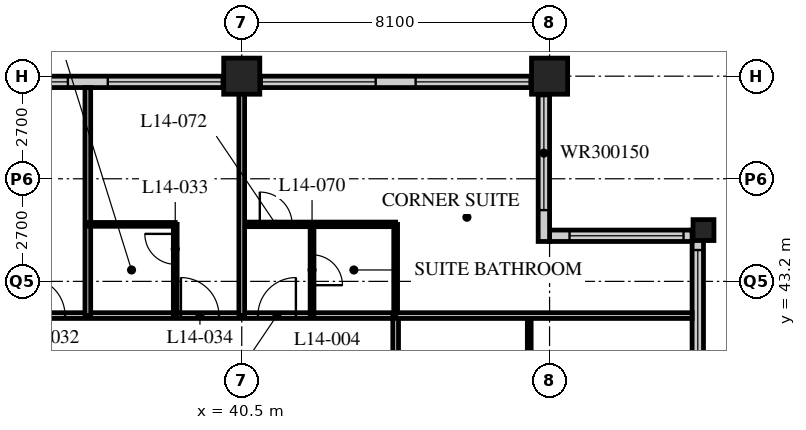
"""IFC4 building model, lengths in metres.
Left out: names, types, materials, properties, quantities, classifications, styles, units other than length and angle.
Written with IfcOpenShell. Run it as: python <this file> out.ifc"""

import sys

from ifc_helpers import new_model, si_unit, direction, frame, frame_2d, origin, origin_2d, place, context, subcontext, project, spatial, rectangle, hollow_rectangle, extrude, element, fill, save


model = new_model("IFC4")
c1 = context("Model", 3, precision=1e-05, world=origin(), true_north=direction((0.0, 1.0)))
c2 = subcontext(c1, "Body", "Model", "MODEL_VIEW")
j1 = project(units=[si_unit("LENGTHUNIT", "METRE"), si_unit("PLANEANGLEUNIT", "RADIAN")], contexts=[c1])
p1 = place(None, origin())
s1 = spatial("IfcSite", under=j1, at=p1, CompositionType="ELEMENT")
p2 = place(p1, origin())
s2 = spatial("IfcBuilding", under=s1, at=p2, CompositionType="ELEMENT")
p3 = place(p2, frame((0.0, 0.0, 60.2)))
s3 = spatial("IfcBuildingStorey", under=s2, at=p3, CompositionType="ELEMENT", Elevation=60.2)
for number, where, z_axis, x_axis in (
    (1, (40.5, 48.6, 0.0), (0.0, 0.0, 1.0), (1.0, 0.0, 0.0)),
    (2, (48.6, 48.6, 0.0), (0.0, 0.0, 1.0), (1.0, 0.0, 0.0)),
):
    element("IfcColumn", number, at=place(p3, frame(where, z_axis=z_axis, x_axis=x_axis)), inside=s3, PredefinedType="COLUMN", context=c2, shape_type="SweptSolid", body=[
        extrude(hollow_rectangle(XDim=0.95, YDim=0.95, WallThickness=0.095, at=origin_2d()), origin(), (0.0, 0.0, 1.0), 3.4),
    ])
p4 = place(p3, frame((52.65, 44.55, 0.0), z_axis=(0.0, 0.0, 1.0), x_axis=(1.0, 0.0, 0.0)))
e3 = element("IfcColumn", 3, at=p4, inside=s3, PredefinedType="COLUMN", context=c2, shape_type="SweptSolid", body=[
    extrude(hollow_rectangle(XDim=0.55, YDim=0.55, WallThickness=0.05, at=origin_2d()), origin(), (0.0, 0.0, 1.0), 3.4),
])
p5 = place(p3, frame((52.5, 40.2, 0.0), z_axis=(0.0, 0.0, 1.0), x_axis=(0.0, 1.0, 0.0)))
e4 = element("IfcWall", 4, at=p5, inside=s3, PredefinedType="SOLIDWALL", context=c2, shape_type="SweptSolid", body=[
    extrude(rectangle(XDim=4.35, YDim=0.3, at=frame_2d((2.175, 0.0))), origin(), (0.0, 0.0, 1.0), 3.19),
])
p6 = place(p5, frame((0.825, 0.0, 0.9)))
e5 = element("IfcOpeningElement", 5, at=p6, cuts=e4, PredefinedType="OPENING", context=c2, shape_type="SweptSolid", body=[
    extrude(rectangle(XDim=3.0, YDim=1.5, at=frame_2d((1.5, 0.75))), frame((0.0, 0.16, 0.0), z_axis=(0.0, -1.0, 0.0), x_axis=(1.0, 0.0, 0.0)), (0.0, 0.0, 1.0), 0.32),
])
p7 = place(p3, frame((52.35, 44.4, 0.0), z_axis=(0.0, 0.0, 1.0), x_axis=(-1.0, 0.0, 0.0)))
e6 = element("IfcWall", 6, at=p7, inside=s3, PredefinedType="SOLIDWALL", context=c2, shape_type="SweptSolid", body=[
    extrude(rectangle(XDim=3.75, YDim=0.3, at=frame_2d((1.875, 0.0))), origin(), (0.0, 0.0, 1.0), 3.19),
])
p8 = place(p7, frame((0.225, 0.0, 0.9)))
e7 = element("IfcOpeningElement", 7, at=p8, cuts=e6, PredefinedType="OPENING", context=c2, shape_type="SweptSolid", body=[
    extrude(rectangle(XDim=3.0, YDim=1.5, at=frame_2d((1.5, 0.75))), frame((0.0, 0.16, 0.0), z_axis=(0.0, -1.0, 0.0), x_axis=(1.0, 0.0, 0.0)), (0.0, 0.0, 1.0), 0.32),
])
p9 = place(p3, frame((48.45, 44.25, 0.0), z_axis=(0.0, 0.0, 1.0), x_axis=(0.0, 1.0, 0.0)))
e8 = element("IfcWall", 8, at=p9, inside=s3, PredefinedType="SOLIDWALL", context=c2, shape_type="SweptSolid", body=[
    extrude(rectangle(XDim=4.35, YDim=0.3, at=frame_2d((2.175, 0.0))), origin(), (0.0, 0.0, 1.0), 3.19),
])
p10 = place(p9, frame((0.825, 0.0, 0.9)))
e9 = element("IfcOpeningElement", 9, at=p10, cuts=e8, PredefinedType="OPENING", context=c2, shape_type="SweptSolid", body=[
    extrude(rectangle(XDim=3.0, YDim=1.5, at=frame_2d((1.5, 0.75))), frame((0.0, 0.16, 0.0), z_axis=(0.0, -1.0, 0.0), x_axis=(1.0, 0.0, 0.0)), (0.0, 0.0, 1.0), 0.32),
])
p11 = place(p3, frame((48.3, 48.45, 0.0), z_axis=(0.0, 0.0, 1.0), x_axis=(-1.0, 0.0, 0.0)))
e10 = element("IfcWall", 10, at=p11, inside=s3, PredefinedType="SOLIDWALL", context=c2, shape_type="SweptSolid", body=[
    extrude(rectangle(XDim=40.2, YDim=0.3, at=frame_2d((20.1, 0.0))), origin(), (0.0, 0.0, 1.0), 3.19),
])
p12 = place(p11, frame((0.225, 0.0, 0.9)))
e11 = element("IfcOpeningElement", 11, at=p12, cuts=e10, PredefinedType="OPENING", context=c2, shape_type="SweptSolid", body=[
    extrude(rectangle(XDim=3.0, YDim=2.0, at=frame_2d((1.5, 1.0))), frame((0.0, 0.16, 0.0), z_axis=(0.0, -1.0, 0.0), x_axis=(1.0, 0.0, 0.0)), (0.0, 0.0, 1.0), 0.32),
])
p13 = place(p11, frame((4.275, 0.0, 0.9)))
e12 = element("IfcOpeningElement", 12, at=p13, cuts=e10, PredefinedType="OPENING", context=c2, shape_type="SweptSolid", body=[
    extrude(rectangle(XDim=3.0, YDim=2.0, at=frame_2d((1.5, 1.0))), frame((0.0, 0.16, 0.0), z_axis=(0.0, -1.0, 0.0), x_axis=(1.0, 0.0, 0.0)), (0.0, 0.0, 1.0), 0.32),
])
p14 = place(p11, frame((8.325, 0.0, 0.9)))
e13 = element("IfcOpeningElement", 13, at=p14, cuts=e10, PredefinedType="OPENING", context=c2, shape_type="SweptSolid", body=[
    extrude(rectangle(XDim=3.0, YDim=2.0, at=frame_2d((1.5, 1.0))), frame((0.0, 0.16, 0.0), z_axis=(0.0, -1.0, 0.0), x_axis=(1.0, 0.0, 0.0)), (0.0, 0.0, 1.0), 0.32),
])
p15 = place(p11, frame((12.375, 0.0, 0.9)))
e14 = element("IfcOpeningElement", 14, at=p15, cuts=e10, PredefinedType="OPENING", context=c2, shape_type="SweptSolid", body=[
    extrude(rectangle(XDim=3.0, YDim=2.0, at=frame_2d((1.5, 1.0))), frame((0.0, 0.16, 0.0), z_axis=(0.0, -1.0, 0.0), x_axis=(1.0, 0.0, 0.0)), (0.0, 0.0, 1.0), 0.32),
])
p16 = place(p11, frame((16.425, 0.0, 0.9)))
e15 = element("IfcOpeningElement", 15, at=p16, cuts=e10, PredefinedType="OPENING", context=c2, shape_type="SweptSolid", body=[
    extrude(rectangle(XDim=3.0, YDim=2.0, at=frame_2d((1.5, 1.0))), frame((0.0, 0.16, 0.0), z_axis=(0.0, -1.0, 0.0), x_axis=(1.0, 0.0, 0.0)), (0.0, 0.0, 1.0), 0.32),
])
p17 = place(p11, frame((20.475, 0.0, 0.9)))
e16 = element("IfcOpeningElement", 16, at=p17, cuts=e10, PredefinedType="OPENING", context=c2, shape_type="SweptSolid", body=[
    extrude(rectangle(XDim=3.0, YDim=2.0, at=frame_2d((1.5, 1.0))), frame((0.0, 0.16, 0.0), z_axis=(0.0, -1.0, 0.0), x_axis=(1.0, 0.0, 0.0)), (0.0, 0.0, 1.0), 0.32),
])
p18 = place(p11, frame((24.525, 0.0, 0.9)))
e17 = element("IfcOpeningElement", 17, at=p18, cuts=e10, PredefinedType="OPENING", context=c2, shape_type="SweptSolid", body=[
    extrude(rectangle(XDim=3.0, YDim=2.0, at=frame_2d((1.5, 1.0))), frame((0.0, 0.16, 0.0), z_axis=(0.0, -1.0, 0.0), x_axis=(1.0, 0.0, 0.0)), (0.0, 0.0, 1.0), 0.32),
])
p19 = place(p11, frame((28.575, 0.0, 0.9)))
e18 = element("IfcOpeningElement", 18, at=p19, cuts=e10, PredefinedType="OPENING", context=c2, shape_type="SweptSolid", body=[
    extrude(rectangle(XDim=3.0, YDim=2.0, at=frame_2d((1.5, 1.0))), frame((0.0, 0.16, 0.0), z_axis=(0.0, -1.0, 0.0), x_axis=(1.0, 0.0, 0.0)), (0.0, 0.0, 1.0), 0.32),
])
p20 = place(p11, frame((32.625, 0.0, 0.9)))
e19 = element("IfcOpeningElement", 19, at=p20, cuts=e10, PredefinedType="OPENING", context=c2, shape_type="SweptSolid", body=[
    extrude(rectangle(XDim=3.0, YDim=2.0, at=frame_2d((1.5, 1.0))), frame((0.0, 0.16, 0.0), z_axis=(0.0, -1.0, 0.0), x_axis=(1.0, 0.0, 0.0)), (0.0, 0.0, 1.0), 0.32),
])
p21 = place(p11, frame((36.675, 0.0, 0.9)))
e20 = element("IfcOpeningElement", 20, at=p21, cuts=e10, PredefinedType="OPENING", context=c2, shape_type="SweptSolid", body=[
    extrude(rectangle(XDim=3.0, YDim=2.0, at=frame_2d((1.5, 1.0))), frame((0.0, 0.16, 0.0), z_axis=(0.0, -1.0, 0.0), x_axis=(1.0, 0.0, 0.0)), (0.0, 0.0, 1.0), 0.32),
])
p22 = place(p3, frame((12.15, 42.3, 0.0), z_axis=(0.0, 0.0, 1.0), x_axis=(1.0, 0.0, 0.0)))
e21 = element("IfcWall", 21, at=p22, inside=s3, PredefinedType="PARTITIONING", context=c2, shape_type="SweptSolid", body=[
    extrude(rectangle(XDim=32.4, YDim=0.15, at=frame_2d((16.2, 0.0))), origin(), (0.0, 0.0, 1.0), 3.19),
])
p23 = place(p22, frame((6.5, 0.0, 0.0)))
e22 = element("IfcOpeningElement", 22, at=p23, cuts=e21, PredefinedType="OPENING", context=c2, shape_type="SweptSolid", body=[
    extrude(rectangle(XDim=1.0, YDim=2.1, at=frame_2d((0.5, 1.05))), frame((0.0, 0.085, 0.0), z_axis=(0.0, -1.0, 0.0), x_axis=(1.0, 0.0, 0.0)), (0.0, 0.0, 1.0), 0.17),
])
p24 = place(p22, frame((10.55, 0.0, 0.0)))
e23 = element("IfcOpeningElement", 23, at=p24, cuts=e21, PredefinedType="OPENING", context=c2, shape_type="SweptSolid", body=[
    extrude(rectangle(XDim=1.0, YDim=2.1, at=frame_2d((0.5, 1.05))), frame((0.0, 0.085, 0.0), z_axis=(0.0, -1.0, 0.0), x_axis=(1.0, 0.0, 0.0)), (0.0, 0.0, 1.0), 0.17),
])
p25 = place(p22, frame((14.6, 0.0, 0.0)))
e24 = element("IfcOpeningElement", 24, at=p25, cuts=e21, PredefinedType="OPENING", context=c2, shape_type="SweptSolid", body=[
    extrude(rectangle(XDim=1.0, YDim=2.1, at=frame_2d((0.5, 1.05))), frame((0.0, 0.085, 0.0), z_axis=(0.0, -1.0, 0.0), x_axis=(1.0, 0.0, 0.0)), (0.0, 0.0, 1.0), 0.17),
])
p26 = place(p22, frame((18.65, 0.0, 0.0)))
e25 = element("IfcOpeningElement", 25, at=p26, cuts=e21, PredefinedType="OPENING", context=c2, shape_type="SweptSolid", body=[
    extrude(rectangle(XDim=1.0, YDim=2.1, at=frame_2d((0.5, 1.05))), frame((0.0, 0.085, 0.0), z_axis=(0.0, -1.0, 0.0), x_axis=(1.0, 0.0, 0.0)), (0.0, 0.0, 1.0), 0.17),
])
p27 = place(p22, frame((22.7, 0.0, 0.0)))
e26 = element("IfcOpeningElement", 26, at=p27, cuts=e21, PredefinedType="OPENING", context=c2, shape_type="SweptSolid", body=[
    extrude(rectangle(XDim=1.0, YDim=2.1, at=frame_2d((0.5, 1.05))), frame((0.0, 0.085, 0.0), z_axis=(0.0, -1.0, 0.0), x_axis=(1.0, 0.0, 0.0)), (0.0, 0.0, 1.0), 0.17),
])
p28 = place(p22, frame((26.75, 0.0, 0.0)))
e27 = element("IfcOpeningElement", 27, at=p28, cuts=e21, PredefinedType="OPENING", context=c2, shape_type="SweptSolid", body=[
    extrude(rectangle(XDim=1.0, YDim=2.1, at=frame_2d((0.5, 1.05))), frame((0.0, 0.085, 0.0), z_axis=(0.0, -1.0, 0.0), x_axis=(1.0, 0.0, 0.0)), (0.0, 0.0, 1.0), 0.17),
])
p29 = place(p22, frame((28.775, 0.0, 0.0)))
e28 = element("IfcOpeningElement", 28, at=p29, cuts=e21, PredefinedType="OPENING", context=c2, shape_type="SweptSolid", body=[
    extrude(rectangle(XDim=1.0, YDim=2.1, at=frame_2d((0.5, 1.05))), frame((0.0, 0.085, 0.0), z_axis=(0.0, -1.0, 0.0), x_axis=(1.0, 0.0, 0.0)), (0.0, 0.0, 1.0), 0.17),
])
p30 = place(p22, frame((2.625, 0.0, 0.0)))
e29 = element("IfcOpeningElement", 29, at=p30, cuts=e21, PredefinedType="OPENING", context=c2, shape_type="SweptSolid", body=[
    extrude(rectangle(XDim=1.0, YDim=2.1, at=frame_2d((0.5, 1.05))), frame((0.0, 0.085, 0.0), z_axis=(0.0, -1.0, 0.0), x_axis=(1.0, 0.0, 0.0)), (0.0, 0.0, 1.0), 0.17),
])
p31 = place(p3, frame((44.55, 12.15, 0.0), z_axis=(0.0, 0.0, 1.0), x_axis=(0.0, 1.0, 0.0)))
e30 = element("IfcWall", 30, at=p31, inside=s3, PredefinedType="PARTITIONING", context=c2, shape_type="SweptSolid", body=[
    extrude(rectangle(XDim=30.15, YDim=0.15, at=frame_2d((15.075, 0.0))), origin(), (0.0, 0.0, 1.0), 3.19),
])
p32 = place(p31, frame((2.75, 0.0, 0.0)))
e31 = element("IfcOpeningElement", 31, at=p32, cuts=e30, PredefinedType="OPENING", context=c2, shape_type="SweptSolid", body=[
    extrude(rectangle(XDim=1.0, YDim=2.1, at=frame_2d((0.5, 1.05))), frame((0.0, 0.085, 0.0), z_axis=(0.0, -1.0, 0.0), x_axis=(1.0, 0.0, 0.0)), (0.0, 0.0, 1.0), 0.17),
])
p33 = place(p31, frame((6.5, 0.0, 0.0)))
e32 = element("IfcOpeningElement", 32, at=p33, cuts=e30, PredefinedType="OPENING", context=c2, shape_type="SweptSolid", body=[
    extrude(rectangle(XDim=1.0, YDim=2.1, at=frame_2d((0.5, 1.05))), frame((0.0, 0.085, 0.0), z_axis=(0.0, -1.0, 0.0), x_axis=(1.0, 0.0, 0.0)), (0.0, 0.0, 1.0), 0.17),
])
p34 = place(p31, frame((10.55, 0.0, 0.0)))
e33 = element("IfcOpeningElement", 33, at=p34, cuts=e30, PredefinedType="OPENING", context=c2, shape_type="SweptSolid", body=[
    extrude(rectangle(XDim=1.0, YDim=2.1, at=frame_2d((0.5, 1.05))), frame((0.0, 0.085, 0.0), z_axis=(0.0, -1.0, 0.0), x_axis=(1.0, 0.0, 0.0)), (0.0, 0.0, 1.0), 0.17),
])
p35 = place(p31, frame((14.6, 0.0, 0.0)))
e34 = element("IfcOpeningElement", 34, at=p35, cuts=e30, PredefinedType="OPENING", context=c2, shape_type="SweptSolid", body=[
    extrude(rectangle(XDim=1.0, YDim=2.1, at=frame_2d((0.5, 1.05))), frame((0.0, 0.085, 0.0), z_axis=(0.0, -1.0, 0.0), x_axis=(1.0, 0.0, 0.0)), (0.0, 0.0, 1.0), 0.17),
])
p36 = place(p31, frame((18.65, 0.0, 0.0)))
e35 = element("IfcOpeningElement", 35, at=p36, cuts=e30, PredefinedType="OPENING", context=c2, shape_type="SweptSolid", body=[
    extrude(rectangle(XDim=1.0, YDim=2.1, at=frame_2d((0.5, 1.05))), frame((0.0, 0.085, 0.0), z_axis=(0.0, -1.0, 0.0), x_axis=(1.0, 0.0, 0.0)), (0.0, 0.0, 1.0), 0.17),
])
p37 = place(p31, frame((22.7, 0.0, 0.0)))
e36 = element("IfcOpeningElement", 36, at=p37, cuts=e30, PredefinedType="OPENING", context=c2, shape_type="SweptSolid", body=[
    extrude(rectangle(XDim=1.0, YDim=2.1, at=frame_2d((0.5, 1.05))), frame((0.0, 0.085, 0.0), z_axis=(0.0, -1.0, 0.0), x_axis=(1.0, 0.0, 0.0)), (0.0, 0.0, 1.0), 0.17),
])
p38 = place(p31, frame((26.7, 0.0, 0.0)))
e37 = element("IfcOpeningElement", 37, at=p38, cuts=e30, PredefinedType="OPENING", context=c2, shape_type="SweptSolid", body=[
    extrude(rectangle(XDim=1.0, YDim=2.1, at=frame_2d((0.5, 1.05))), frame((0.0, 0.085, 0.0), z_axis=(0.0, -1.0, 0.0), x_axis=(1.0, 0.0, 0.0)), (0.0, 0.0, 1.0), 0.17),
])
p39 = place(p3, frame((36.45, 42.3, 0.0), z_axis=(0.0, 0.0, 1.0), x_axis=(0.0, 1.0, 0.0)))
e38 = element("IfcWall", 38, at=p39, inside=s3, PredefinedType="PARTITIONING", context=c2, shape_type="SweptSolid", body=[
    extrude(rectangle(XDim=6.0, YDim=0.15, at=frame_2d((3.0, 0.0))), origin(), (0.0, 0.0, 1.0), 3.19),
])
p40 = place(p3, frame((36.45, 44.7, 0.0), z_axis=(0.0, 0.0, 1.0), x_axis=(1.0, 0.0, 0.0)))
e39 = element("IfcWall", 39, at=p40, inside=s3, PredefinedType="PARTITIONING", context=c2, shape_type="SweptSolid", body=[
    extrude(rectangle(XDim=2.3, YDim=0.1, at=frame_2d((1.15, 0.0))), origin(), (0.0, 0.0, 1.0), 3.19),
])
p41 = place(p3, frame((38.75, 42.3, 0.0), z_axis=(0.0, 0.0, 1.0), x_axis=(0.0, 1.0, 0.0)))
e40 = element("IfcWall", 40, at=p41, inside=s3, PredefinedType="PARTITIONING", context=c2, shape_type="SweptSolid", body=[
    extrude(rectangle(XDim=2.4, YDim=0.1, at=frame_2d((1.2, 0.0))), origin(), (0.0, 0.0, 1.0), 3.19),
])
p42 = place(p41, frame((1.35, 0.0, 0.0)))
e41 = element("IfcOpeningElement", 41, at=p42, cuts=e40, PredefinedType="OPENING", context=c2, shape_type="SweptSolid", body=[
    extrude(rectangle(XDim=0.8, YDim=2.1, at=frame_2d((0.4, 1.05))), frame((0.0, 0.06, 0.0), z_axis=(0.0, -1.0, 0.0), x_axis=(1.0, 0.0, 0.0)), (0.0, 0.0, 1.0), 0.12),
])
p43 = place(p3, frame((48.065, 40.0, 0.0), z_axis=(0.0, 0.0, 1.0), x_axis=(0.0, 1.0, 0.0)))
e42 = element("IfcWall", 42, at=p43, inside=s3, PredefinedType="PARTITIONING", context=c2, shape_type="SweptSolid", body=[
    extrude(rectangle(XDim=2.3, YDim=0.1, at=frame_2d((1.15, 0.0))), origin(), (0.0, 0.0, 1.0), 3.19),
])
p44 = place(p3, frame((40.5, 44.7, 0.0), z_axis=(0.0, 0.0, 1.0), x_axis=(1.0, 0.0, 0.0)))
e43 = element("IfcWall", 43, at=p44, inside=s3, PredefinedType="PARTITIONING", context=c2, shape_type="SweptSolid", body=[
    extrude(rectangle(XDim=4.05, YDim=0.12, at=frame_2d((2.025, 0.0))), origin(), (0.0, 0.0, 1.0), 3.19),
])
p45 = place(p44, frame((0.475, 0.0, 0.0)))
e44 = element("IfcOpeningElement", 44, at=p45, cuts=e43, PredefinedType="OPENING", context=c2, shape_type="SweptSolid", body=[
    extrude(rectangle(XDim=0.85, YDim=2.1, at=frame_2d((0.425, 1.05))), frame((0.0, 0.07, 0.0), z_axis=(0.0, -1.0, 0.0), x_axis=(1.0, 0.0, 0.0)), (0.0, 0.0, 1.0), 0.14),
])
p46 = place(p3, frame((42.35, 42.3, 0.0), z_axis=(0.0, 0.0, 1.0), x_axis=(0.0, 1.0, 0.0)))
e45 = element("IfcWall", 45, at=p46, inside=s3, PredefinedType="PARTITIONING", context=c2, shape_type="SweptSolid", body=[
    extrude(rectangle(XDim=2.4, YDim=0.1, at=frame_2d((1.2, 0.0))), origin(), (0.0, 0.0, 1.0), 3.19),
])
p47 = place(p46, frame((0.8, 0.0, 0.0)))
e46 = element("IfcOpeningElement", 46, at=p47, cuts=e45, PredefinedType="OPENING", context=c2, shape_type="SweptSolid", body=[
    extrude(rectangle(XDim=0.8, YDim=2.1, at=frame_2d((0.4, 1.05))), frame((0.0, 0.06, 0.0), z_axis=(0.0, -1.0, 0.0), x_axis=(1.0, 0.0, 0.0)), (0.0, 0.0, 1.0), 0.12),
])
p48 = place(p3, frame((44.55, 42.3, 0.0), z_axis=(0.0, 0.0, 1.0), x_axis=(0.0, 1.0, 0.0)))
e47 = element("IfcWall", 47, at=p48, inside=s3, PredefinedType="PARTITIONING", context=c2, shape_type="SweptSolid", body=[
    extrude(rectangle(XDim=2.4, YDim=0.1, at=frame_2d((1.2, 0.0))), origin(), (0.0, 0.0, 1.0), 3.19),
])
p49 = place(p3, frame((44.55, 42.3, 0.0), z_axis=(0.0, 0.0, 1.0), x_axis=(1.0, 0.0, 0.0)))
e48 = element("IfcWall", 48, at=p49, inside=s3, PredefinedType="PARTITIONING", context=c2, shape_type="SweptSolid", body=[
    extrude(rectangle(XDim=7.8, YDim=0.15, at=frame_2d((3.9, 0.0))), origin(), (0.0, 0.0, 1.0), 3.19),
])
p50 = place(p3, frame((40.5, 42.3, 0.0), z_axis=(0.0, 0.0, 1.0), x_axis=(0.0, 1.0, 0.0)))
e49 = element("IfcWall", 49, at=p50, inside=s3, PredefinedType="PARTITIONING", context=c2, shape_type="SweptSolid", body=[
    extrude(rectangle(XDim=6.0, YDim=0.15, at=frame_2d((3.0, 0.0))), origin(), (0.0, 0.0, 1.0), 2.578),
])
p51 = place(p6, origin())
e50 = element("IfcWindow", 50, at=p51, inside=s3, PartitioningType="SINGLE_PANEL", PredefinedType="WINDOW", context=c2, shape_type="SweptSolid", body=[
    extrude(rectangle(XDim=3.0, YDim=1.5, at=frame_2d((1.5, 0.75))), frame((0.0, 0.03, 0.0), z_axis=(0.0, -1.0, 0.0), x_axis=(1.0, 0.0, 0.0)), (0.0, 0.0, 1.0), 0.06),
])
fill(e5, e50)
p52 = place(p8, origin())
e51 = element("IfcWindow", 51, at=p52, inside=s3, PartitioningType="SINGLE_PANEL", PredefinedType="WINDOW", context=c2, shape_type="SweptSolid", body=[
    extrude(rectangle(XDim=3.0, YDim=1.5, at=frame_2d((1.5, 0.75))), frame((0.0, 0.03, 0.0), z_axis=(0.0, -1.0, 0.0), x_axis=(1.0, 0.0, 0.0)), (0.0, 0.0, 1.0), 0.06),
])
fill(e7, e51)
p53 = place(p10, origin())
e52 = element("IfcWindow", 52, at=p53, inside=s3, PartitioningType="SINGLE_PANEL", PredefinedType="WINDOW", context=c2, shape_type="SweptSolid", body=[
    extrude(rectangle(XDim=3.0, YDim=1.5, at=frame_2d((1.5, 0.75))), frame((0.0, 0.03, 0.0), z_axis=(0.0, -1.0, 0.0), x_axis=(1.0, 0.0, 0.0)), (0.0, 0.0, 1.0), 0.06),
])
fill(e9, e52)
p54 = place(p12, origin())
e53 = element("IfcWindow", 53, at=p54, inside=s3, PartitioningType="SINGLE_PANEL", PredefinedType="WINDOW", context=c2, shape_type="SweptSolid", body=[
    extrude(rectangle(XDim=3.0, YDim=2.0, at=frame_2d((1.5, 1.0))), frame((0.0, 0.03, 0.0), z_axis=(0.0, -1.0, 0.0), x_axis=(1.0, 0.0, 0.0)), (0.0, 0.0, 1.0), 0.06),
])
fill(e11, e53)
p55 = place(p13, origin())
e54 = element("IfcWindow", 54, at=p55, inside=s3, PartitioningType="SINGLE_PANEL", PredefinedType="WINDOW", context=c2, shape_type="SweptSolid", body=[
    extrude(rectangle(XDim=3.0, YDim=2.0, at=frame_2d((1.5, 1.0))), frame((0.0, 0.03, 0.0), z_axis=(0.0, -1.0, 0.0), x_axis=(1.0, 0.0, 0.0)), (0.0, 0.0, 1.0), 0.06),
])
fill(e12, e54)
p56 = place(p14, origin())
e55 = element("IfcWindow", 55, at=p56, inside=s3, PartitioningType="SINGLE_PANEL", PredefinedType="WINDOW", context=c2, shape_type="SweptSolid", body=[
    extrude(rectangle(XDim=3.0, YDim=2.0, at=frame_2d((1.5, 1.0))), frame((0.0, 0.03, 0.0), z_axis=(0.0, -1.0, 0.0), x_axis=(1.0, 0.0, 0.0)), (0.0, 0.0, 1.0), 0.06),
])
fill(e13, e55)
p57 = place(p15, origin())
e56 = element("IfcWindow", 56, at=p57, inside=s3, PartitioningType="SINGLE_PANEL", PredefinedType="WINDOW", context=c2, shape_type="SweptSolid", body=[
    extrude(rectangle(XDim=3.0, YDim=2.0, at=frame_2d((1.5, 1.0))), frame((0.0, 0.03, 0.0), z_axis=(0.0, -1.0, 0.0), x_axis=(1.0, 0.0, 0.0)), (0.0, 0.0, 1.0), 0.06),
])
fill(e14, e56)
p58 = place(p27, origin())
e57 = element("IfcDoor", 57, at=p58, inside=s3, OperationType="SINGLE_SWING_LEFT", PredefinedType="DOOR", context=c2, shape_type="SweptSolid", body=[
    extrude(rectangle(XDim=1.0, YDim=2.1, at=frame_2d((0.5, 1.05))), frame((0.0, 0.025, 0.0), z_axis=(0.0, -1.0, 0.0), x_axis=(1.0, 0.0, 0.0)), (0.0, 0.0, 1.0), 0.05),
])
fill(e26, e57)
p59 = place(p42, origin())
e58 = element("IfcDoor", 58, at=p59, inside=s3, OperationType="SINGLE_SWING_RIGHT", PredefinedType="DOOR", context=c2, shape_type="SweptSolid", body=[
    extrude(rectangle(XDim=0.8, YDim=2.1, at=frame_2d((0.4, 1.05))), frame((0.0, 0.025, 0.0), z_axis=(0.0, -1.0, 0.0), x_axis=(1.0, 0.0, 0.0)), (0.0, 0.0, 1.0), 0.05),
])
fill(e41, e58)
p60 = place(p28, origin())
e59 = element("IfcDoor", 59, at=p60, inside=s3, OperationType="SINGLE_SWING_LEFT", PredefinedType="DOOR", context=c2, shape_type="SweptSolid", body=[
    extrude(rectangle(XDim=1.0, YDim=2.1, at=frame_2d((0.5, 1.05))), frame((0.0, 0.025, 0.0), z_axis=(0.0, -1.0, 0.0), x_axis=(1.0, 0.0, 0.0)), (0.0, 0.0, 1.0), 0.05),
])
fill(e27, e59)
p61 = place(p47, origin())
e60 = element("IfcDoor", 60, at=p61, inside=s3, OperationType="SINGLE_SWING_RIGHT", PredefinedType="DOOR", context=c2, shape_type="SweptSolid", body=[
    extrude(rectangle(XDim=0.8, YDim=2.1, at=frame_2d((0.4, 1.05))), frame((0.0, 0.025, 0.0), z_axis=(0.0, -1.0, 0.0), x_axis=(1.0, 0.0, 0.0)), (0.0, 0.0, 1.0), 0.05),
])
fill(e46, e60)
p62 = place(p29, origin())
e61 = element("IfcDoor", 61, at=p62, inside=s3, OperationType="SINGLE_SWING_RIGHT", PredefinedType="DOOR", context=c2, shape_type="SweptSolid", body=[
    extrude(rectangle(XDim=1.0, YDim=2.1, at=frame_2d((0.5, 1.05))), frame((0.0, 0.025, 0.0), z_axis=(0.0, -1.0, 0.0), x_axis=(1.0, 0.0, 0.0)), (0.0, 0.0, 1.0), 0.05),
])
fill(e28, e61)
p63 = place(p45, origin())
e62 = element("IfcDoor", 62, at=p63, inside=s3, OperationType="SINGLE_SWING_LEFT", PredefinedType="DOOR", context=c2, shape_type="SweptSolid", body=[
    extrude(rectangle(XDim=0.85, YDim=2.1, at=frame_2d((0.425, 1.05))), frame((0.0, 0.025, 0.0), z_axis=(0.0, -1.0, 0.0), x_axis=(1.0, 0.0, 0.0)), (0.0, 0.0, 1.0), 0.05),
])
fill(e44, e62)
save(model, sys.argv[1])
